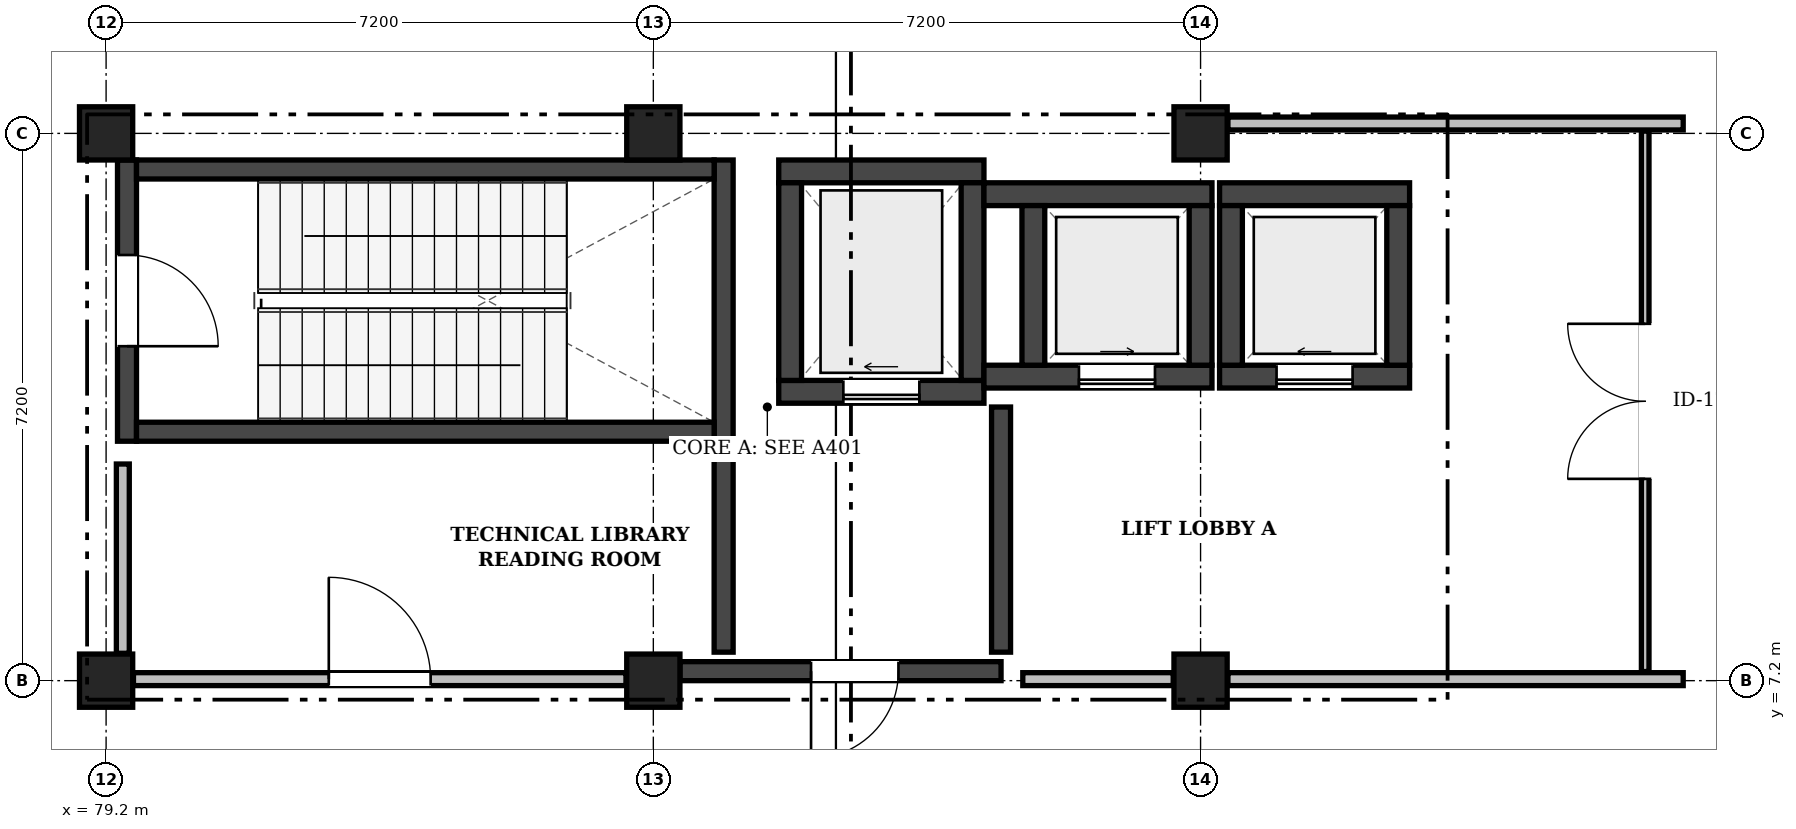
"""IFC4 building model, lengths in metres.
Left out: names, types, materials, properties, quantities, classifications, styles, units other than length and angle.
Written with IfcOpenShell. Run it as: python <this file> out.ifc"""

import sys

from ifc_helpers import new_model, si_unit, direction, frame, frame_2d, origin, origin_2d, place, context, subcontext, project, spatial, rectangle, extrude, element, fill, save


model = new_model("IFC4")
c1 = context("Model", 3, precision=1e-05, world=origin(), true_north=direction((0.0, 1.0)))
c2 = subcontext(c1, "Body", "Model", "MODEL_VIEW")
j1 = project(units=[si_unit("LENGTHUNIT", "METRE"), si_unit("PLANEANGLEUNIT", "RADIAN")], contexts=[c1])
p1 = place(None, origin())
s1 = spatial("IfcSite", under=j1, at=p1, CompositionType="ELEMENT")
p2 = place(p1, origin())
s2 = spatial("IfcBuilding", under=s1, at=p2, CompositionType="ELEMENT")
p3 = place(p2, frame((0.0, 0.0, 18.9)))
s3 = spatial("IfcBuildingStorey", under=s2, at=p3, CompositionType="ELEMENT", Elevation=18.9)
for number, where, z_axis, x_axis in (
    (1, (79.2, 7.2, 0.0), (0.0, 0.0, 1.0), (1.0, 0.0, 0.0)),
    (2, (79.2, 14.4, 0.0), (0.0, 0.0, 1.0), (1.0, 0.0, 0.0)),
    (3, (86.4, 7.2, 0.0), (0.0, 0.0, 1.0), (1.0, 0.0, 0.0)),
    (4, (86.4, 14.4, 0.0), (0.0, 0.0, 1.0), (1.0, 0.0, 0.0)),
    (5, (93.6, 7.2, 0.0), (0.0, 0.0, 1.0), (1.0, 0.0, 0.0)),
    (6, (93.6, 14.4, 0.0), (0.0, 0.0, 1.0), (1.0, 0.0, 0.0)),
):
    element("IfcColumn", number, at=place(p3, frame(where, z_axis=z_axis, x_axis=x_axis)), inside=s3, PredefinedType="COLUMN", context=c2, shape_type="SweptSolid", body=[
        extrude(rectangle(XDim=0.7, YDim=0.7, at=origin_2d()), origin(), (0.0, 0.0, 1.0), 4.5),
    ])
p4 = place(p3, frame((88.05, 11.0, 0.0), z_axis=(0.0, 0.0, 1.0), x_axis=(1.0, 0.0, 0.0)))
e7 = element("IfcWall", 7, at=p4, inside=s3, PredefinedType="SHEAR", context=c2, shape_type="SweptSolid", body=[
    extrude(rectangle(XDim=2.7, YDim=0.3, at=frame_2d((1.35, 0.0))), origin(), (0.0, 0.0, 1.0), 4.25),
])
p5 = place(p4, frame((0.85, 0.0, 0.0)))
e8 = element("IfcOpeningElement", 8, at=p5, cuts=e7, PredefinedType="OPENING", context=c2, shape_type="SweptSolid", body=[
    extrude(rectangle(XDim=1.0, YDim=2.1, at=frame_2d((0.5, 1.05))), frame((0.0, 0.162, 0.0), z_axis=(0.0, -1.0, 0.0), x_axis=(1.0, 0.0, 0.0)), (0.0, 0.0, 1.0), 0.324),
])
p6 = place(p3, frame((88.05, 13.9, 0.0), z_axis=(0.0, 0.0, 1.0), x_axis=(1.0, 0.0, 0.0)))
e9 = element("IfcWall", 9, at=p6, inside=s3, PredefinedType="SHEAR", context=c2, shape_type="SweptSolid", body=[
    extrude(rectangle(XDim=2.7, YDim=0.3, at=frame_2d((1.35, 0.0))), origin(), (0.0, 0.0, 1.0), 4.25),
])
for number, where, z_axis, x_axis in (
    (10, (88.2, 11.15, 0.0), (0.0, 0.0, 1.0), (0.0, 1.0, 0.0)),
    (11, (90.6, 11.15, 0.0), (0.0, 0.0, 1.0), (0.0, 1.0, 0.0)),
):
    element("IfcWall", number, at=place(p3, frame(where, z_axis=z_axis, x_axis=x_axis)), inside=s3, PredefinedType="SHEAR", context=c2, shape_type="SweptSolid", body=[
        extrude(rectangle(XDim=2.6, YDim=0.3, at=frame_2d((1.3, 0.0))), origin(), (0.0, 0.0, 1.0), 4.25),
    ])
p7 = place(p3, frame((90.75, 11.2, 0.0), z_axis=(0.0, 0.0, 1.0), x_axis=(1.0, 0.0, 0.0)))
e12 = element("IfcWall", 12, at=p7, inside=s3, PredefinedType="SHEAR", context=c2, shape_type="SweptSolid", body=[
    extrude(rectangle(XDim=3.0, YDim=0.3, at=frame_2d((1.5, 0.0))), origin(), (0.0, 0.0, 1.0), 4.25),
])
p8 = place(p7, frame((1.25, 0.0, 0.0)))
e13 = element("IfcOpeningElement", 13, at=p8, cuts=e12, PredefinedType="OPENING", context=c2, shape_type="SweptSolid", body=[
    extrude(rectangle(XDim=1.0, YDim=2.1, at=frame_2d((0.5, 1.05))), frame((0.0, 0.162, 0.0), z_axis=(0.0, -1.0, 0.0), x_axis=(1.0, 0.0, 0.0)), (0.0, 0.0, 1.0), 0.324),
])
p9 = place(p3, frame((90.75, 13.6, 0.0), z_axis=(0.0, 0.0, 1.0), x_axis=(1.0, 0.0, 0.0)))
e14 = element("IfcWall", 14, at=p9, inside=s3, PredefinedType="SHEAR", context=c2, shape_type="SweptSolid", body=[
    extrude(rectangle(XDim=3.0, YDim=0.3, at=frame_2d((1.5, 0.0))), origin(), (0.0, 0.0, 1.0), 4.25),
])
for number, where, z_axis, x_axis in (
    (15, (91.4, 11.35, 0.0), (0.0, 0.0, 1.0), (0.0, 1.0, 0.0)),
    (16, (93.6, 11.35, 0.0), (0.0, 0.0, 1.0), (0.0, 1.0, 0.0)),
):
    element("IfcWall", number, at=place(p3, frame(where, z_axis=z_axis, x_axis=x_axis)), inside=s3, PredefinedType="SHEAR", context=c2, shape_type="SweptSolid", body=[
        extrude(rectangle(XDim=2.1, YDim=0.3, at=frame_2d((1.05, 0.0))), origin(), (0.0, 0.0, 1.0), 4.25),
    ])
p10 = place(p3, frame((93.85, 11.2, 0.0), z_axis=(0.0, 0.0, 1.0), x_axis=(1.0, 0.0, 0.0)))
e17 = element("IfcWall", 17, at=p10, inside=s3, PredefinedType="SHEAR", context=c2, shape_type="SweptSolid", body=[
    extrude(rectangle(XDim=2.5, YDim=0.3, at=frame_2d((1.25, 0.0))), origin(), (0.0, 0.0, 1.0), 4.25),
])
p11 = place(p10, frame((0.75, 0.0, 0.0)))
e18 = element("IfcOpeningElement", 18, at=p11, cuts=e17, PredefinedType="OPENING", context=c2, shape_type="SweptSolid", body=[
    extrude(rectangle(XDim=1.0, YDim=2.1, at=frame_2d((0.5, 1.05))), frame((0.0, 0.162, 0.0), z_axis=(0.0, -1.0, 0.0), x_axis=(1.0, 0.0, 0.0)), (0.0, 0.0, 1.0), 0.324),
])
p12 = place(p3, frame((93.85, 13.6, 0.0), z_axis=(0.0, 0.0, 1.0), x_axis=(1.0, 0.0, 0.0)))
e19 = element("IfcWall", 19, at=p12, inside=s3, PredefinedType="SHEAR", context=c2, shape_type="SweptSolid", body=[
    extrude(rectangle(XDim=2.5, YDim=0.3, at=frame_2d((1.25, 0.0))), origin(), (0.0, 0.0, 1.0), 4.25),
])
for number, where, z_axis, x_axis in (
    (20, (94.0, 11.35, 0.0), (0.0, 0.0, 1.0), (0.0, 1.0, 0.0)),
    (21, (96.2, 11.35, 0.0), (0.0, 0.0, 1.0), (0.0, 1.0, 0.0)),
):
    element("IfcWall", number, at=place(p3, frame(where, z_axis=z_axis, x_axis=x_axis)), inside=s3, PredefinedType="SHEAR", context=c2, shape_type="SweptSolid", body=[
        extrude(rectangle(XDim=2.1, YDim=0.3, at=frame_2d((1.05, 0.0))), origin(), (0.0, 0.0, 1.0), 4.25),
    ])
p13 = place(p3, frame((79.475, 10.35, 0.0), z_axis=(0.0, 0.0, 1.0), x_axis=(0.0, 1.0, 0.0)))
e22 = element("IfcWall", 22, at=p13, inside=s3, PredefinedType="SHEAR", context=c2, shape_type="SweptSolid", body=[
    extrude(rectangle(XDim=3.7, YDim=0.25, at=frame_2d((1.85, 0.0))), origin(), (0.0, 0.0, 1.0), 4.25),
])
p14 = place(p13, frame((1.25, 0.0, 0.0)))
e23 = element("IfcOpeningElement", 23, at=p14, cuts=e22, PredefinedType="OPENING", context=c2, shape_type="SweptSolid", body=[
    extrude(rectangle(XDim=1.2, YDim=2.15, at=frame_2d((0.6, 1.075))), frame((0.0, 0.137, 0.0), z_axis=(0.0, -1.0, 0.0), x_axis=(1.0, 0.0, 0.0)), (0.0, 0.0, 1.0), 0.274),
])
p15 = place(p3, frame((87.325, 10.35, 0.0), z_axis=(0.0, 0.0, 1.0), x_axis=(0.0, 1.0, 0.0)))
e24 = element("IfcWall", 24, at=p15, inside=s3, PredefinedType="SHEAR", context=c2, shape_type="SweptSolid", body=[
    extrude(rectangle(XDim=3.7, YDim=0.25, at=frame_2d((1.85, 0.0))), origin(), (0.0, 0.0, 1.0), 4.25),
])
for number, where, z_axis, x_axis in (
    (25, (79.6, 10.475, 0.0), (0.0, 0.0, 1.0), (1.0, 0.0, 0.0)),
    (26, (79.6, 13.925, 0.0), (0.0, 0.0, 1.0), (1.0, 0.0, 0.0)),
):
    element("IfcWall", number, at=place(p3, frame(where, z_axis=z_axis, x_axis=x_axis)), inside=s3, PredefinedType="SHEAR", context=c2, shape_type="SweptSolid", body=[
        extrude(rectangle(XDim=7.6, YDim=0.25, at=frame_2d((3.8, 0.0))), origin(), (0.0, 0.0, 1.0), 4.25),
    ])
p16 = place(p3, frame((86.75, 7.325, 0.0), z_axis=(0.0, 0.0, 1.0), x_axis=(1.0, 0.0, 0.0)))
e27 = element("IfcWall", 27, at=p16, inside=s3, PredefinedType="SHEAR", context=c2, shape_type="SweptSolid", body=[
    extrude(rectangle(XDim=4.225, YDim=0.25, at=frame_2d((2.113, 0.0))), origin(), (0.0, 0.0, 1.0), 4.25),
])
p17 = place(p16, frame((1.725, 0.0, 0.0)))
e28 = element("IfcOpeningElement", 28, at=p17, cuts=e27, PredefinedType="OPENING", context=c2, shape_type="SweptSolid", body=[
    extrude(rectangle(XDim=1.15, YDim=2.15, at=frame_2d((0.575, 1.075))), frame((0.0, 0.137, 0.0), z_axis=(0.0, -1.0, 0.0), x_axis=(1.0, 0.0, 0.0)), (0.0, 0.0, 1.0), 0.274),
])
p18 = place(p3, frame((87.325, 7.575, 0.0), z_axis=(0.0, 0.0, 1.0), x_axis=(0.0, 1.0, 0.0)))
e29 = element("IfcWall", 29, at=p18, inside=s3, PredefinedType="SHEAR", context=c2, shape_type="SweptSolid", body=[
    extrude(rectangle(XDim=2.77, YDim=0.25, at=frame_2d((1.385, 0.0))), origin(), (0.0, 0.0, 1.0), 4.25),
])
p19 = place(p3, frame((90.975, 7.575, 0.0), z_axis=(0.0, 0.0, 1.0), x_axis=(0.0, 1.0, 0.0)))
e30 = element("IfcWall", 30, at=p19, inside=s3, PredefinedType="SHEAR", context=c2, shape_type="SweptSolid", body=[
    extrude(rectangle(XDim=3.225, YDim=0.25, at=frame_2d((1.613, 0.0))), origin(), (0.0, 0.0, 1.0), 4.25),
])
p20 = place(p3, frame((93.96, 14.53, 0.0), z_axis=(0.0, 0.0, 1.0), x_axis=(1.0, 0.0, 0.0)))
e31 = element("IfcWall", 31, at=p20, inside=s3, PredefinedType="PARTITIONING", context=c2, shape_type="SweptSolid", body=[
    extrude(rectangle(XDim=5.99, YDim=0.17, at=frame_2d((2.995, 0.0))), origin(), (0.0, 0.0, 1.0), 3.73),
])
p21 = place(p3, frame((79.42, 7.56, 0.0), z_axis=(0.0, 0.0, 1.0), x_axis=(0.0, 1.0, 0.0)))
e32 = element("IfcWall", 32, at=p21, inside=s3, PredefinedType="PARTITIONING", context=c2, shape_type="SweptSolid", body=[
    extrude(rectangle(XDim=2.49, YDim=0.17, at=frame_2d((1.245, 0.0))), origin(), (0.0, 0.0, 1.0), 3.73),
])
p22 = place(p3, frame((79.56, 7.22, 0.0), z_axis=(0.0, 0.0, 1.0), x_axis=(1.0, 0.0, 0.0)))
e33 = element("IfcWall", 33, at=p22, inside=s3, PredefinedType="PARTITIONING", context=c2, shape_type="SweptSolid", body=[
    extrude(rectangle(XDim=6.48, YDim=0.17, at=frame_2d((3.24, 0.0))), origin(), (0.0, 0.0, 1.0), 3.73),
])
p23 = place(p22, frame((2.57, 0.0, 0.0)))
e34 = element("IfcOpeningElement", 34, at=p23, cuts=e33, PredefinedType="OPENING", context=c2, shape_type="SweptSolid", body=[
    extrude(rectangle(XDim=1.34, YDim=2.24, at=frame_2d((0.67, 1.12))), frame((0.0, 0.097, 0.0), z_axis=(0.0, -1.0, 0.0), x_axis=(1.0, 0.0, 0.0)), (0.0, 0.0, 1.0), 0.194),
])
p24 = place(p3, frame((91.261, 7.22, 0.0), z_axis=(0.0, 0.0, 1.0), x_axis=(1.0, 0.0, 0.0)))
e35 = element("IfcWall", 35, at=p24, inside=s3, PredefinedType="PARTITIONING", context=c2, shape_type="SweptSolid", body=[
    extrude(rectangle(XDim=1.979, YDim=0.17, at=frame_2d((0.99, 0.0))), origin(), (0.0, 0.0, 1.0), 3.73),
])
p25 = place(p3, frame((93.96, 7.22, 0.0), z_axis=(0.0, 0.0, 1.0), x_axis=(1.0, 0.0, 0.0)))
e36 = element("IfcWall", 36, at=p25, inside=s3, PredefinedType="PARTITIONING", context=c2, shape_type="SweptSolid", body=[
    extrude(rectangle(XDim=5.99, YDim=0.17, at=frame_2d((2.995, 0.0))), origin(), (0.0, 0.0, 1.0), 3.73),
])
p26 = place(p3, frame((99.45, 7.32, 0.0), z_axis=(0.0, 0.0, 1.0), x_axis=(0.0, 1.0, 0.0)))
e37 = element("IfcWall", 37, at=p26, inside=s3, PredefinedType="PARTITIONING", context=c2, shape_type="SweptSolid", body=[
    extrude(rectangle(XDim=7.11, YDim=0.1, at=frame_2d((3.555, 0.0))), origin(), (0.0, 0.0, 1.0), 4.16),
])
p27 = place(p26, frame((2.535, 0.0, 0.0)))
e38 = element("IfcOpeningElement", 38, at=p27, cuts=e37, PredefinedType="OPENING", context=c2, shape_type="SweptSolid", body=[
    extrude(rectangle(XDim=2.04, YDim=2.34, at=frame_2d((1.02, 1.17))), frame((0.0, 0.062, 0.0), z_axis=(0.0, -1.0, 0.0), x_axis=(1.0, 0.0, 0.0)), (0.0, 0.0, 1.0), 0.124),
])
p28 = place(p5, frame((1.0, 0.0, 0.0), z_axis=(0.0, 0.0, 1.0), x_axis=(-1.0, 0.0, 0.0)))
e39 = element("IfcDoor", 39, at=p28, inside=s3, OperationType="SLIDING_TO_LEFT", PredefinedType="DOOR", context=c2, shape_type="SweptSolid", body=[
    extrude(rectangle(XDim=1.0, YDim=2.1, at=frame_2d((0.5, 1.05))), frame((0.0, 0.025, 0.0), z_axis=(0.0, -1.0, 0.0), x_axis=(1.0, 0.0, 0.0)), (0.0, 0.0, 1.0), 0.05),
])
fill(e8, e39)
p29 = place(p8, frame((1.0, 0.0, 0.0), z_axis=(0.0, 0.0, 1.0), x_axis=(-1.0, 0.0, 0.0)))
e40 = element("IfcDoor", 40, at=p29, inside=s3, OperationType="SLIDING_TO_RIGHT", PredefinedType="DOOR", context=c2, shape_type="SweptSolid", body=[
    extrude(rectangle(XDim=1.0, YDim=2.1, at=frame_2d((0.5, 1.05))), frame((0.0, 0.025, 0.0), z_axis=(0.0, -1.0, 0.0), x_axis=(1.0, 0.0, 0.0)), (0.0, 0.0, 1.0), 0.05),
])
fill(e13, e40)
p30 = place(p11, frame((1.0, 0.0, 0.0), z_axis=(0.0, 0.0, 1.0), x_axis=(-1.0, 0.0, 0.0)))
e41 = element("IfcDoor", 41, at=p30, inside=s3, OperationType="SLIDING_TO_LEFT", PredefinedType="DOOR", context=c2, shape_type="SweptSolid", body=[
    extrude(rectangle(XDim=1.0, YDim=2.1, at=frame_2d((0.5, 1.05))), frame((0.0, 0.025, 0.0), z_axis=(0.0, -1.0, 0.0), x_axis=(1.0, 0.0, 0.0)), (0.0, 0.0, 1.0), 0.05),
])
fill(e18, e41)
p31 = place(p14, frame((1.2, 0.0, 0.0), z_axis=(0.0, 0.0, 1.0), x_axis=(-1.0, 0.0, 0.0)))
e42 = element("IfcDoor", 42, at=p31, inside=s3, OperationType="SINGLE_SWING_RIGHT", PredefinedType="DOOR", context=c2, shape_type="SweptSolid", body=[
    extrude(rectangle(XDim=1.2, YDim=2.15, at=frame_2d((0.6, 1.075))), frame((0.0, 0.025, 0.0), z_axis=(0.0, -1.0, 0.0), x_axis=(1.0, 0.0, 0.0)), (0.0, 0.0, 1.0), 0.05),
])
fill(e23, e42)
p32 = place(p17, frame((1.15, 0.0, 0.0), z_axis=(0.0, 0.0, 1.0), x_axis=(-1.0, 0.0, 0.0)))
e43 = element("IfcDoor", 43, at=p32, inside=s3, OperationType="SINGLE_SWING_RIGHT", PredefinedType="DOOR", context=c2, shape_type="SweptSolid", body=[
    extrude(rectangle(XDim=1.15, YDim=2.15, at=frame_2d((0.575, 1.075))), frame((0.0, 0.025, 0.0), z_axis=(0.0, -1.0, 0.0), x_axis=(1.0, 0.0, 0.0)), (0.0, 0.0, 1.0), 0.05),
])
fill(e28, e43)
p33 = place(p23, origin())
e44 = element("IfcDoor", 44, at=p33, inside=s3, OperationType="SINGLE_SWING_LEFT", PredefinedType="DOOR", context=c2, shape_type="SweptSolid", body=[
    extrude(rectangle(XDim=1.34, YDim=2.24, at=frame_2d((0.67, 1.12))), frame((0.0, 0.025, 0.0), z_axis=(0.0, -1.0, 0.0), x_axis=(1.0, 0.0, 0.0)), (0.0, 0.0, 1.0), 0.05),
])
fill(e34, e44)
p34 = place(p27, origin())
e45 = element("IfcDoor", 45, at=p34, inside=s3, OperationType="DOUBLE_DOOR_SINGLE_SWING", PredefinedType="DOOR", context=c2, shape_type="SweptSolid", body=[
    extrude(rectangle(XDim=2.04, YDim=2.34, at=frame_2d((1.02, 1.17))), frame((0.0, 0.025, 0.0), z_axis=(0.0, -1.0, 0.0), x_axis=(1.0, 0.0, 0.0)), (0.0, 0.0, 1.0), 0.05),
])
fill(e38, e45)
save(model, sys.argv[1])
